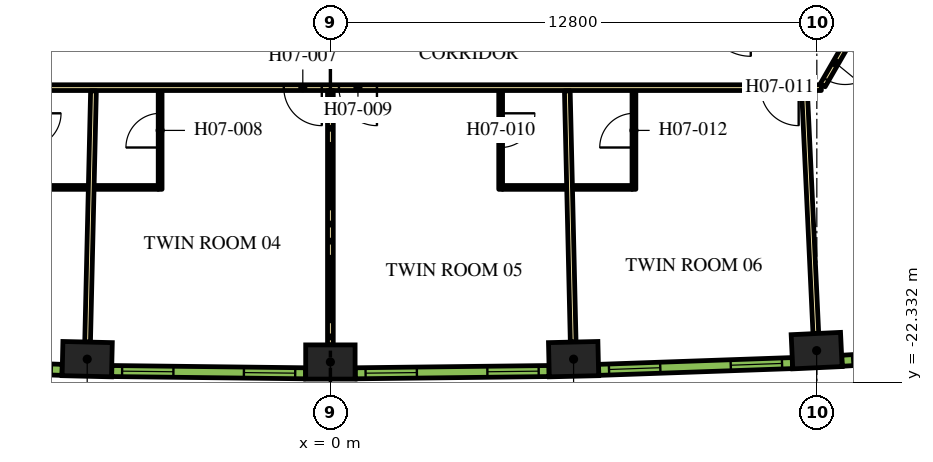
"""IFC4 building model, lengths in metres.
Left out: names, types, materials, properties, quantities, classifications, styles, units other than length and angle.
Written with IfcOpenShell. Run it as: python <this file> out.ifc"""

import sys

from ifc_helpers import new_model, si_unit, direction, frame, frame_2d, origin, origin_2d, place, context, subcontext, project, spatial, rectangle, extrude, element, fill, save


model = new_model("IFC4")
c1 = context("Model", 3, precision=1e-05, world=origin(), true_north=direction((0.0, 1.0)))
c2 = subcontext(c1, "Body", "Model", "MODEL_VIEW")
j1 = project(units=[si_unit("LENGTHUNIT", "METRE"), si_unit("PLANEANGLEUNIT", "RADIAN")], contexts=[c1])
p1 = place(None, origin())
s1 = spatial("IfcSite", under=j1, at=p1, CompositionType="ELEMENT")
p2 = place(p1, origin())
s2 = spatial("IfcBuilding", under=s1, at=p2, CompositionType="ELEMENT")
p3 = place(p2, frame((0.0, 0.0, 103.2)))
s3 = spatial("IfcBuildingStorey", under=s2, at=p3, CompositionType="ELEMENT", Elevation=103.2)
for number, where, z_axis, x_axis in (
    (1, (-6.399, -21.719, 0.0), (0.0, 0.0, 1.0), (1.0, -0.023, 0.0)),
    (2, (0.0, -21.794, 0.0), (0.0, 0.0, 1.0), (1.0, 0.0, 0.0)),
    (3, (6.399, -21.719, 0.0), (0.0, 0.0, 1.0), (1.0, 0.023, 0.0)),
    (4, (12.795, -21.494, 0.0), (0.0, 0.0, 1.0), (0.999, 0.047, 0.0)),
):
    element("IfcColumn", number, at=place(p3, frame(where, z_axis=z_axis, x_axis=x_axis)), inside=s3, PredefinedType="COLUMN", context=c2, shape_type="SweptSolid", body=[
        extrude(rectangle(XDim=1.3, YDim=0.9, at=origin_2d()), origin(), (0.0, 0.0, 1.0), 3.9),
    ])
p4 = place(p3, frame((12.918, -14.575, 0.0), z_axis=(0.0, 0.0, 1.0), x_axis=(-1.0, 0.0, 0.0)))
e5 = element("IfcWall", 5, at=p4, inside=s3, PredefinedType="PARTITIONING", context=c2, shape_type="SweptSolid", body=[
    extrude(rectangle(XDim=25.766, YDim=0.15, at=frame_2d((12.883, 0.0))), origin(), (0.0, 0.0, 1.0), 2.75),
])
p5 = place(p4, frame((24.24, 0.0, 0.0)))
e6 = element("IfcOpeningElement", 6, at=p5, cuts=e5, PredefinedType="OPENING", context=c2, shape_type="SweptSolid", body=[
    extrude(rectangle(XDim=1.0, YDim=2.1, at=frame_2d((0.5, 1.05))), frame((0.0, 0.085, 0.0), z_axis=(0.0, -1.0, 0.0), x_axis=(1.0, 0.0, 0.0)), (0.0, 0.0, 1.0), 0.17),
])
p6 = place(p4, frame((13.144, 0.0, 0.0)))
e7 = element("IfcOpeningElement", 7, at=p6, cuts=e5, PredefinedType="OPENING", context=c2, shape_type="SweptSolid", body=[
    extrude(rectangle(XDim=1.0, YDim=2.1, at=frame_2d((0.5, 1.05))), frame((0.0, 0.085, 0.0), z_axis=(0.0, -1.0, 0.0), x_axis=(1.0, 0.0, 0.0)), (0.0, 0.0, 1.0), 0.17),
])
p7 = place(p4, frame((11.693, 0.0, 0.0)))
e8 = element("IfcOpeningElement", 8, at=p7, cuts=e5, PredefinedType="OPENING", context=c2, shape_type="SweptSolid", body=[
    extrude(rectangle(XDim=1.0, YDim=2.1, at=frame_2d((0.5, 1.05))), frame((0.0, 0.085, 0.0), z_axis=(0.0, -1.0, 0.0), x_axis=(1.0, 0.0, 0.0)), (0.0, 0.0, 1.0), 0.17),
])
p8 = place(p4, frame((0.596, 0.0, 0.0)))
e9 = element("IfcOpeningElement", 9, at=p8, cuts=e5, PredefinedType="OPENING", context=c2, shape_type="SweptSolid", body=[
    extrude(rectangle(XDim=1.0, YDim=2.1, at=frame_2d((0.5, 1.05))), frame((0.0, 0.085, 0.0), z_axis=(0.0, -1.0, 0.0), x_axis=(1.0, 0.0, 0.0)), (0.0, 0.0, 1.0), 0.17),
])
p9 = place(p3, frame((15.587, -9.952, 0.0), z_axis=(0.0, 0.0, 1.0), x_axis=(-0.500016618951, -0.866015808616, 0.0)))
e10 = element("IfcWall", 10, at=p9, inside=s3, PredefinedType="PARTITIONING", context=c2, shape_type="SweptSolid", body=[
    extrude(rectangle(XDim=5.268, YDim=0.15, at=frame_2d((2.634, 0.0))), origin(), (0.0, 0.0, 1.0), 2.75),
])
p10 = place(p9, frame((4.088, 0.0, 0.0)))
e11 = element("IfcOpeningElement", 11, at=p10, cuts=e10, PredefinedType="OPENING", context=c2, shape_type="SweptSolid", body=[
    extrude(rectangle(XDim=1.0, YDim=2.1, at=frame_2d((0.5, 1.05))), frame((0.0, 0.085, 0.0), z_axis=(0.0, -1.0, 0.0), x_axis=(1.0, 0.0, 0.0)), (0.0, 0.0, 1.0), 0.17),
])
p11 = place(p3, frame((-6.389, -21.269, 0.0), z_axis=(0.0, 0.0, 1.0), x_axis=(0.023377429176, 0.999726710559, 0.0)))
e12 = element("IfcWall", 12, at=p11, inside=s3, PredefinedType="PARTITIONING", context=c2, shape_type="SweptSolid", body=[
    extrude(rectangle(XDim=6.611, YDim=0.15, at=frame_2d((3.305, 0.0))), origin(), (0.0, 0.0, 1.0), 2.75),
])
p12 = place(p3, frame((0.0, -21.344, 0.0), z_axis=(0.0, 0.0, 1.0), x_axis=(0.0, 1.0, 0.0)))
e13 = element("IfcWall", 13, at=p12, inside=s3, PredefinedType="PARTITIONING", context=c2, shape_type="SweptSolid", body=[
    extrude(rectangle(XDim=6.694, YDim=0.15, at=frame_2d((3.347, 0.0))), origin(), (0.0, 0.0, 1.0), 2.75),
])
p13 = place(p3, frame((6.389, -21.269, 0.0), z_axis=(0.0, 0.0, 1.0), x_axis=(-0.023377429176, 0.999726710559, 0.0)))
e14 = element("IfcWall", 14, at=p13, inside=s3, PredefinedType="PARTITIONING", context=c2, shape_type="SweptSolid", body=[
    extrude(rectangle(XDim=6.611, YDim=0.15, at=frame_2d((3.305, 0.0))), origin(), (0.0, 0.0, 1.0), 2.75),
])
p14 = place(p3, frame((12.774, -21.045, 0.0), z_axis=(0.0, 0.0, 1.0), x_axis=(-0.046750341626, 0.998906605023, 0.0)))
e15 = element("IfcWall", 15, at=p14, inside=s3, PredefinedType="PARTITIONING", context=c2, shape_type="SweptSolid", body=[
    extrude(rectangle(XDim=6.392, YDim=0.15, at=frame_2d((3.196, 0.0))), origin(), (0.0, 0.0, 1.0), 2.75),
])
p15 = place(p3, frame((-7.938, -17.2, 0.0), z_axis=(0.0, 0.0, 1.0), x_axis=(1.0, 0.0, 0.0)))
e16 = element("IfcWall", 16, at=p15, inside=s3, PredefinedType="PARTITIONING", context=c2, shape_type="SweptSolid", body=[
    extrude(rectangle(XDim=1.56, YDim=0.1, at=frame_2d((0.78, 0.0))), origin(), (0.0, 0.0, 1.0), 2.75),
])
p16 = place(p3, frame((-4.48, -17.25, 0.0), z_axis=(0.0, 0.0, 1.0), x_axis=(0.0, 1.0, 0.0)))
e17 = element("IfcWall", 17, at=p16, inside=s3, PredefinedType="PARTITIONING", context=c2, shape_type="SweptSolid", body=[
    extrude(rectangle(XDim=2.6, YDim=0.1, at=frame_2d((1.3, 0.0))), origin(), (0.0, 0.0, 1.0), 2.75),
])
p17 = place(p16, frame((1.1, 0.0, 0.0)))
e18 = element("IfcOpeningElement", 18, at=p17, cuts=e17, PredefinedType="OPENING", context=c2, shape_type="SweptSolid", body=[
    extrude(rectangle(XDim=0.9, YDim=2.1, at=frame_2d((0.45, 1.05))), frame((0.0, 0.06, 0.0), z_axis=(0.0, -1.0, 0.0), x_axis=(1.0, 0.0, 0.0)), (0.0, 0.0, 1.0), 0.12),
])
p18 = place(p3, frame((-4.53, -17.2, 0.0), z_axis=(0.0, 0.0, 1.0), x_axis=(-1.0, 0.0, 0.0)))
e19 = element("IfcWall", 19, at=p18, inside=s3, PredefinedType="PARTITIONING", context=c2, shape_type="SweptSolid", body=[
    extrude(rectangle(XDim=1.68, YDim=0.1, at=frame_2d((0.84, 0.0))), origin(), (0.0, 0.0, 1.0), 2.75),
])
p19 = place(p3, frame((4.48, -14.65, 0.0), z_axis=(0.0, 0.0, 1.0), x_axis=(0.0, -1.0, 0.0)))
e20 = element("IfcWall", 20, at=p19, inside=s3, PredefinedType="PARTITIONING", context=c2, shape_type="SweptSolid", body=[
    extrude(rectangle(XDim=2.6, YDim=0.1, at=frame_2d((1.3, 0.0))), origin(), (0.0, 0.0, 1.0), 2.75),
])
p20 = place(p19, frame((0.6, 0.0, 0.0)))
e21 = element("IfcOpeningElement", 21, at=p20, cuts=e20, PredefinedType="OPENING", context=c2, shape_type="SweptSolid", body=[
    extrude(rectangle(XDim=0.9, YDim=2.1, at=frame_2d((0.45, 1.05))), frame((0.0, 0.06, 0.0), z_axis=(0.0, -1.0, 0.0), x_axis=(1.0, 0.0, 0.0)), (0.0, 0.0, 1.0), 0.12),
])
p21 = place(p3, frame((4.53, -17.2, 0.0), z_axis=(0.0, 0.0, 1.0), x_axis=(1.0, 0.0, 0.0)))
e22 = element("IfcWall", 22, at=p21, inside=s3, PredefinedType="PARTITIONING", context=c2, shape_type="SweptSolid", body=[
    extrude(rectangle(XDim=1.68, YDim=0.1, at=frame_2d((0.84, 0.0))), origin(), (0.0, 0.0, 1.0), 2.75),
])
p22 = place(p3, frame((7.988, -17.25, 0.0), z_axis=(0.0, 0.0, 1.0), x_axis=(0.0, 1.0, 0.0)))
e23 = element("IfcWall", 23, at=p22, inside=s3, PredefinedType="PARTITIONING", context=c2, shape_type="SweptSolid", body=[
    extrude(rectangle(XDim=2.6, YDim=0.1, at=frame_2d((1.3, 0.0))), origin(), (0.0, 0.0, 1.0), 2.75),
])
p23 = place(p22, frame((1.1, 0.0, 0.0)))
e24 = element("IfcOpeningElement", 24, at=p23, cuts=e23, PredefinedType="OPENING", context=c2, shape_type="SweptSolid", body=[
    extrude(rectangle(XDim=0.9, YDim=2.1, at=frame_2d((0.45, 1.05))), frame((0.0, 0.06, 0.0), z_axis=(0.0, -1.0, 0.0), x_axis=(1.0, 0.0, 0.0)), (0.0, 0.0, 1.0), 0.12),
])
p24 = place(p3, frame((7.938, -17.2, 0.0), z_axis=(0.0, 0.0, 1.0), x_axis=(-1.0, 0.0, 0.0)))
e25 = element("IfcWall", 25, at=p24, inside=s3, PredefinedType="PARTITIONING", context=c2, shape_type="SweptSolid", body=[
    extrude(rectangle(XDim=1.56, YDim=0.1, at=frame_2d((0.78, 0.0))), origin(), (0.0, 0.0, 1.0), 2.75),
])
p25 = place(p3, frame((-12.157, -21.822, 0.0), z_axis=(0.0, 0.0, 1.0), x_axis=(0.999385993957, -0.035037623812, 0.0)))
e26 = element("IfcWall", 26, at=p25, inside=s3, PredefinedType="SOLIDWALL", context=c2, shape_type="SweptSolid", body=[
    extrude(rectangle(XDim=5.101, YDim=0.29, at=frame_2d((2.55, 0.0))), origin(), (0.0, 0.0, 1.0), 3.65),
])
p26 = place(p25, frame((0.273, 0.0, 0.9)))
e27 = element("IfcOpeningElement", 27, at=p26, cuts=e26, PredefinedType="OPENING", context=c2, shape_type="SweptSolid", body=[
    extrude(rectangle(XDim=1.35, YDim=2.15, at=frame_2d((0.675, 1.075))), frame((0.0, 0.155, 0.0), z_axis=(0.0, -1.0, 0.0), x_axis=(1.0, 0.0, 0.0)), (0.0, 0.0, 1.0), 0.31),
])
p27 = place(p25, frame((3.478, 0.0, 0.9)))
e28 = element("IfcOpeningElement", 28, at=p27, cuts=e26, PredefinedType="OPENING", context=c2, shape_type="SweptSolid", body=[
    extrude(rectangle(XDim=1.35, YDim=2.15, at=frame_2d((0.675, 1.075))), frame((0.0, 0.155, 0.0), z_axis=(0.0, -1.0, 0.0), x_axis=(1.0, 0.0, 0.0)), (0.0, 0.0, 1.0), 0.31),
])
p28 = place(p3, frame((-5.753, -22.031, 0.0), z_axis=(0.0, 0.0, 1.0), x_axis=(0.999931786565, -0.011679992145, 0.0)))
e29 = element("IfcWall", 29, at=p28, inside=s3, PredefinedType="SOLIDWALL", context=c2, shape_type="SweptSolid", body=[
    extrude(rectangle(XDim=5.1, YDim=0.29, at=frame_2d((2.55, 0.0))), origin(), (0.0, 0.0, 1.0), 3.65),
])
p29 = place(p28, frame((0.272, 0.0, 0.9)))
e30 = element("IfcOpeningElement", 30, at=p29, cuts=e29, PredefinedType="OPENING", context=c2, shape_type="SweptSolid", body=[
    extrude(rectangle(XDim=1.35, YDim=2.15, at=frame_2d((0.675, 1.075))), frame((0.0, 0.155, 0.0), z_axis=(0.0, -1.0, 0.0), x_axis=(1.0, 0.0, 0.0)), (0.0, 0.0, 1.0), 0.31),
])
p30 = place(p28, frame((3.478, 0.0, 0.9)))
e31 = element("IfcOpeningElement", 31, at=p30, cuts=e29, PredefinedType="OPENING", context=c2, shape_type="SweptSolid", body=[
    extrude(rectangle(XDim=1.35, YDim=2.15, at=frame_2d((0.675, 1.075))), frame((0.0, 0.155, 0.0), z_axis=(0.0, -1.0, 0.0), x_axis=(1.0, 0.0, 0.0)), (0.0, 0.0, 1.0), 0.31),
])
p31 = place(p3, frame((0.653, -22.091, 0.0), z_axis=(0.0, 0.0, 1.0), x_axis=(0.999931786565, 0.011679992145, 0.0)))
e32 = element("IfcWall", 32, at=p31, inside=s3, PredefinedType="SOLIDWALL", context=c2, shape_type="SweptSolid", body=[
    extrude(rectangle(XDim=5.1, YDim=0.29, at=frame_2d((2.55, 0.0))), origin(), (0.0, 0.0, 1.0), 3.65),
])
p32 = place(p31, frame((0.273, 0.0, 0.9)))
e33 = element("IfcOpeningElement", 33, at=p32, cuts=e32, PredefinedType="OPENING", context=c2, shape_type="SweptSolid", body=[
    extrude(rectangle(XDim=1.35, YDim=2.15, at=frame_2d((0.675, 1.075))), frame((0.0, 0.155, 0.0), z_axis=(0.0, -1.0, 0.0), x_axis=(1.0, 0.0, 0.0)), (0.0, 0.0, 1.0), 0.31),
])
p33 = place(p31, frame((3.478, 0.0, 0.9)))
e34 = element("IfcOpeningElement", 34, at=p33, cuts=e32, PredefinedType="OPENING", context=c2, shape_type="SweptSolid", body=[
    extrude(rectangle(XDim=1.35, YDim=2.15, at=frame_2d((0.675, 1.075))), frame((0.0, 0.155, 0.0), z_axis=(0.0, -1.0, 0.0), x_axis=(1.0, 0.0, 0.0)), (0.0, 0.0, 1.0), 0.31),
])
p34 = place(p3, frame((7.059, -22.001, 0.0), z_axis=(0.0, 0.0, 1.0), x_axis=(0.999385993957, 0.035037623812, 0.0)))
e35 = element("IfcWall", 35, at=p34, inside=s3, PredefinedType="SOLIDWALL", context=c2, shape_type="SweptSolid", body=[
    extrude(rectangle(XDim=5.101, YDim=0.29, at=frame_2d((2.55, 0.0))), origin(), (0.0, 0.0, 1.0), 3.65),
])
p35 = place(p34, frame((0.273, 0.0, 0.9)))
e36 = element("IfcOpeningElement", 36, at=p35, cuts=e35, PredefinedType="OPENING", context=c2, shape_type="SweptSolid", body=[
    extrude(rectangle(XDim=1.35, YDim=2.15, at=frame_2d((0.675, 1.075))), frame((0.0, 0.155, 0.0), z_axis=(0.0, -1.0, 0.0), x_axis=(1.0, 0.0, 0.0)), (0.0, 0.0, 1.0), 0.31),
])
p36 = place(p34, frame((3.478, 0.0, 0.9)))
e37 = element("IfcOpeningElement", 37, at=p36, cuts=e35, PredefinedType="OPENING", context=c2, shape_type="SweptSolid", body=[
    extrude(rectangle(XDim=1.35, YDim=2.15, at=frame_2d((0.675, 1.075))), frame((0.0, 0.155, 0.0), z_axis=(0.0, -1.0, 0.0), x_axis=(1.0, 0.0, 0.0)), (0.0, 0.0, 1.0), 0.31),
])
p37 = place(p3, frame((13.462, -21.761, 0.0), z_axis=(0.0, 0.0, 1.0), x_axis=(0.998290511436, 0.058447025388, 0.0)))
e38 = element("IfcWall", 38, at=p37, inside=s3, PredefinedType="SOLIDWALL", context=c2, shape_type="SweptSolid", body=[
    extrude(rectangle(XDim=5.1, YDim=0.29, at=frame_2d((2.55, 0.0))), origin(), (0.0, 0.0, 1.0), 3.65),
])
p38 = place(p37, frame((0.272, 0.0, 0.9)))
e39 = element("IfcOpeningElement", 39, at=p38, cuts=e38, PredefinedType="OPENING", context=c2, shape_type="SweptSolid", body=[
    extrude(rectangle(XDim=1.35, YDim=2.15, at=frame_2d((0.675, 1.075))), frame((0.0, 0.155, 0.0), z_axis=(0.0, -1.0, 0.0), x_axis=(1.0, 0.0, 0.0)), (0.0, 0.0, 1.0), 0.31),
])
p39 = place(p37, frame((3.478, 0.0, 0.9)))
e40 = element("IfcOpeningElement", 40, at=p39, cuts=e38, PredefinedType="OPENING", context=c2, shape_type="SweptSolid", body=[
    extrude(rectangle(XDim=1.35, YDim=2.15, at=frame_2d((0.675, 1.075))), frame((0.0, 0.155, 0.0), z_axis=(0.0, -1.0, 0.0), x_axis=(1.0, 0.0, 0.0)), (0.0, 0.0, 1.0), 0.31),
])
p40 = place(p6, origin())
e41 = element("IfcDoor", 41, at=p40, inside=s3, OperationType="SINGLE_SWING_LEFT", PredefinedType="DOOR", context=c2, shape_type="SweptSolid", body=[
    extrude(rectangle(XDim=1.0, YDim=2.1, at=frame_2d((0.5, 1.05))), frame((0.0, 0.025, 0.0), z_axis=(0.0, -1.0, 0.0), x_axis=(1.0, 0.0, 0.0)), (0.0, 0.0, 1.0), 0.05),
])
fill(e7, e41)
p41 = place(p17, origin())
e42 = element("IfcDoor", 42, at=p41, inside=s3, OperationType="SINGLE_SWING_LEFT", PredefinedType="DOOR", context=c2, shape_type="SweptSolid", body=[
    extrude(rectangle(XDim=0.9, YDim=2.1, at=frame_2d((0.45, 1.05))), frame((0.0, 0.025, 0.0), z_axis=(0.0, -1.0, 0.0), x_axis=(1.0, 0.0, 0.0)), (0.0, 0.0, 1.0), 0.05),
])
fill(e18, e42)
p42 = place(p7, origin())
e43 = element("IfcDoor", 43, at=p42, inside=s3, OperationType="SINGLE_SWING_RIGHT", PredefinedType="DOOR", context=c2, shape_type="SweptSolid", body=[
    extrude(rectangle(XDim=1.0, YDim=2.1, at=frame_2d((0.5, 1.05))), frame((0.0, 0.025, 0.0), z_axis=(0.0, -1.0, 0.0), x_axis=(1.0, 0.0, 0.0)), (0.0, 0.0, 1.0), 0.05),
])
fill(e8, e43)
p43 = place(p20, origin())
e44 = element("IfcDoor", 44, at=p43, inside=s3, OperationType="SINGLE_SWING_LEFT", PredefinedType="DOOR", context=c2, shape_type="SweptSolid", body=[
    extrude(rectangle(XDim=0.9, YDim=2.1, at=frame_2d((0.45, 1.05))), frame((0.0, 0.025, 0.0), z_axis=(0.0, -1.0, 0.0), x_axis=(1.0, 0.0, 0.0)), (0.0, 0.0, 1.0), 0.05),
])
fill(e21, e44)
p44 = place(p8, origin())
e45 = element("IfcDoor", 45, at=p44, inside=s3, OperationType="SINGLE_SWING_LEFT", PredefinedType="DOOR", context=c2, shape_type="SweptSolid", body=[
    extrude(rectangle(XDim=1.0, YDim=2.1, at=frame_2d((0.5, 1.05))), frame((0.0, 0.025, 0.0), z_axis=(0.0, -1.0, 0.0), x_axis=(1.0, 0.0, 0.0)), (0.0, 0.0, 1.0), 0.05),
])
fill(e9, e45)
p45 = place(p23, origin())
e46 = element("IfcDoor", 46, at=p45, inside=s3, OperationType="SINGLE_SWING_RIGHT", PredefinedType="DOOR", context=c2, shape_type="SweptSolid", body=[
    extrude(rectangle(XDim=0.9, YDim=2.1, at=frame_2d((0.45, 1.05))), frame((0.0, 0.025, 0.0), z_axis=(0.0, -1.0, 0.0), x_axis=(1.0, 0.0, 0.0)), (0.0, 0.0, 1.0), 0.05),
])
fill(e24, e46)
p46 = place(p10, origin())
e47 = element("IfcDoor", 47, at=p46, inside=s3, OperationType="SINGLE_SWING_RIGHT", PredefinedType="DOOR", context=c2, shape_type="SweptSolid", body=[
    extrude(rectangle(XDim=1.0, YDim=2.1, at=frame_2d((0.5, 1.05))), frame((0.0, 0.025, 0.0), z_axis=(0.0, -1.0, 0.0), x_axis=(1.0, 0.0, 0.0)), (0.0, 0.0, 1.0), 0.05),
])
fill(e11, e47)
p47 = place(p29, origin())
e48 = element("IfcWindow", 48, at=p47, inside=s3, PartitioningType="DOUBLE_PANEL_VERTICAL", PredefinedType="WINDOW", context=c2, shape_type="SweptSolid", body=[
    extrude(rectangle(XDim=1.35, YDim=2.15, at=frame_2d((0.675, 1.075))), frame((0.0, 0.015, 0.0), z_axis=(0.0, -1.0, 0.0), x_axis=(1.0, 0.0, 0.0)), (0.0, 0.0, 1.0), 0.06),
])
fill(e30, e48)
p48 = place(p30, origin())
e49 = element("IfcWindow", 49, at=p48, inside=s3, PartitioningType="DOUBLE_PANEL_VERTICAL", PredefinedType="WINDOW", context=c2, shape_type="SweptSolid", body=[
    extrude(rectangle(XDim=1.35, YDim=2.15, at=frame_2d((0.675, 1.075))), frame((0.0, 0.015, 0.0), z_axis=(0.0, -1.0, 0.0), x_axis=(1.0, 0.0, 0.0)), (0.0, 0.0, 1.0), 0.06),
])
fill(e31, e49)
p49 = place(p32, origin())
e50 = element("IfcWindow", 50, at=p49, inside=s3, PartitioningType="DOUBLE_PANEL_VERTICAL", PredefinedType="WINDOW", context=c2, shape_type="SweptSolid", body=[
    extrude(rectangle(XDim=1.35, YDim=2.15, at=frame_2d((0.675, 1.075))), frame((0.0, 0.015, 0.0), z_axis=(0.0, -1.0, 0.0), x_axis=(1.0, 0.0, 0.0)), (0.0, 0.0, 1.0), 0.06),
])
fill(e33, e50)
p50 = place(p33, origin())
e51 = element("IfcWindow", 51, at=p50, inside=s3, PartitioningType="DOUBLE_PANEL_VERTICAL", PredefinedType="WINDOW", context=c2, shape_type="SweptSolid", body=[
    extrude(rectangle(XDim=1.35, YDim=2.15, at=frame_2d((0.675, 1.075))), frame((0.0, 0.015, 0.0), z_axis=(0.0, -1.0, 0.0), x_axis=(1.0, 0.0, 0.0)), (0.0, 0.0, 1.0), 0.06),
])
fill(e34, e51)
p51 = place(p35, origin())
e52 = element("IfcWindow", 52, at=p51, inside=s3, PartitioningType="DOUBLE_PANEL_VERTICAL", PredefinedType="WINDOW", context=c2, shape_type="SweptSolid", body=[
    extrude(rectangle(XDim=1.35, YDim=2.15, at=frame_2d((0.675, 1.075))), frame((0.0, 0.015, 0.0), z_axis=(0.0, -1.0, 0.0), x_axis=(1.0, 0.0, 0.0)), (0.0, 0.0, 1.0), 0.06),
])
fill(e36, e52)
p52 = place(p36, origin())
e53 = element("IfcWindow", 53, at=p52, inside=s3, PartitioningType="DOUBLE_PANEL_VERTICAL", PredefinedType="WINDOW", context=c2, shape_type="SweptSolid", body=[
    extrude(rectangle(XDim=1.35, YDim=2.15, at=frame_2d((0.675, 1.075))), frame((0.0, 0.015, 0.0), z_axis=(0.0, -1.0, 0.0), x_axis=(1.0, 0.0, 0.0)), (0.0, 0.0, 1.0), 0.06),
])
fill(e37, e53)
p53 = place(p38, origin())
e54 = element("IfcWindow", 54, at=p53, inside=s3, PartitioningType="DOUBLE_PANEL_VERTICAL", PredefinedType="WINDOW", context=c2, shape_type="SweptSolid", body=[
    extrude(rectangle(XDim=1.35, YDim=2.15, at=frame_2d((0.675, 1.075))), frame((0.0, 0.015, 0.0), z_axis=(0.0, -1.0, 0.0), x_axis=(1.0, 0.0, 0.0)), (0.0, 0.0, 1.0), 0.06),
])
fill(e39, e54)
save(model, sys.argv[1])
